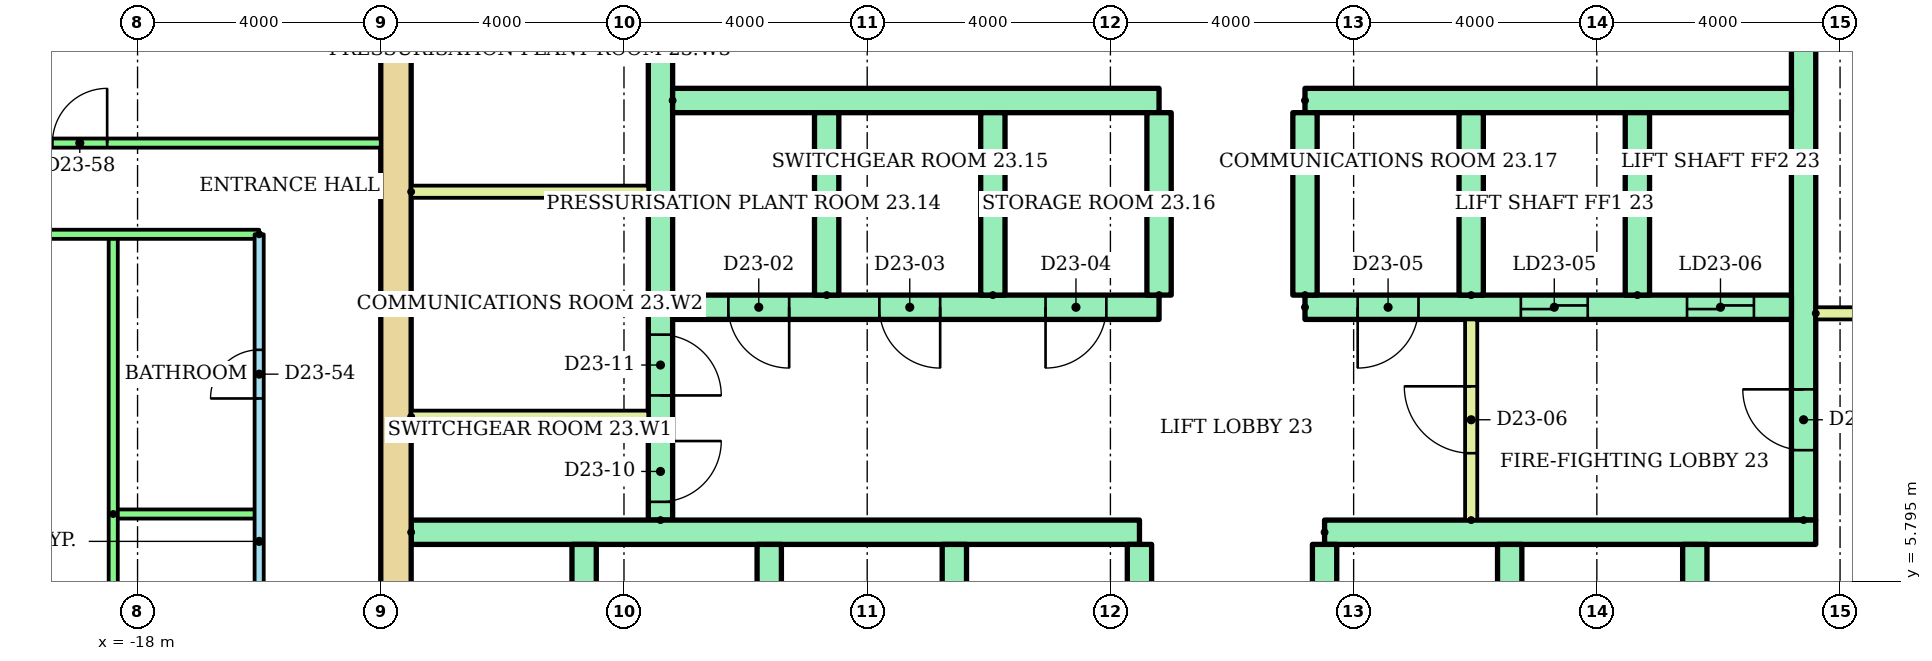
"""IFC4 building model, lengths in metres.
Left out: names, types, materials, properties, quantities, classifications, styles, units other than length and angle.
Written with IfcOpenShell. Run it as: python <this file> out.ifc"""

import sys

from ifc_helpers import new_model, si_unit, direction, frame, frame_2d, origin, place, context, subcontext, project, spatial, rectangle, extrude, element, fill, save


model = new_model("IFC4")
c1 = context("Model", 3, precision=1e-05, world=origin(), true_north=direction((0.0, 1.0)))
c2 = subcontext(c1, "Body", "Model", "MODEL_VIEW")
j1 = project(units=[si_unit("LENGTHUNIT", "METRE"), si_unit("PLANEANGLEUNIT", "RADIAN")], contexts=[c1])
p1 = place(None, origin())
s1 = spatial("IfcSite", under=j1, at=p1, CompositionType="ELEMENT")
p2 = place(p1, origin())
s2 = spatial("IfcBuilding", under=s1, at=p2, CompositionType="ELEMENT")
p3 = place(p2, frame((0.0, 0.0, 90.3)))
s3 = spatial("IfcBuildingStorey", under=s2, at=p3, CompositionType="ELEMENT", Elevation=90.3)
p4 = place(p3, frame((-13.75, 3.0, 0.0), z_axis=(0.0, 0.0, 1.0), x_axis=(0.0, 1.0, 0.0)))
e1 = element("IfcWall", 1, at=p4, inside=s3, PredefinedType="SHEAR", context=c2, shape_type="SweptSolid", body=[
    extrude(rectangle(XDim=17.0, YDim=0.5, at=frame_2d((8.5, 0.0))), origin(), (0.0, 0.0, 1.0), 2.92),
])
p5 = place(p3, frame((-9.4, 6.8, 0.0), z_axis=(0.0, 0.0, 1.0), x_axis=(0.0, 1.0, 0.0)))
e2 = element("IfcWall", 2, at=p5, inside=s3, PredefinedType="SHEAR", context=c2, shape_type="SweptSolid", body=[
    extrude(rectangle(XDim=12.7, YDim=0.4, at=frame_2d((6.35, 0.0))), origin(), (0.0, 0.0, 1.0), 2.92),
])
p6 = place(p5, frame((0.3, 0.0, 0.0)))
e3 = element("IfcOpeningElement", 3, at=p6, cuts=e2, PredefinedType="OPENING", context=c2, shape_type="SweptSolid", body=[
    extrude(rectangle(XDim=1.0, YDim=2.1, at=frame_2d((0.5, 1.05))), frame((0.0, 0.21, 0.0), z_axis=(0.0, -1.0, 0.0), x_axis=(1.0, 0.0, 0.0)), (0.0, 0.0, 1.0), 0.42),
])
p7 = place(p5, frame((2.05, 0.0, 0.0)))
e4 = element("IfcOpeningElement", 4, at=p7, cuts=e2, PredefinedType="OPENING", context=c2, shape_type="SweptSolid", body=[
    extrude(rectangle(XDim=1.0, YDim=2.1, at=frame_2d((0.5, 1.05))), frame((0.0, 0.21, 0.0), z_axis=(0.0, -1.0, 0.0), x_axis=(1.0, 0.0, 0.0)), (0.0, 0.0, 1.0), 0.42),
])
p8 = place(p5, frame((7.925, 0.0, 0.0)))
e5 = element("IfcOpeningElement", 5, at=p8, cuts=e2, PredefinedType="OPENING", context=c2, shape_type="SweptSolid", body=[
    extrude(rectangle(XDim=1.0, YDim=2.1, at=frame_2d((0.5, 1.05))), frame((0.0, 0.21, 0.0), z_axis=(0.0, -1.0, 0.0), x_axis=(1.0, 0.0, 0.0)), (0.0, 0.0, 1.0), 0.42),
])
p9 = place(p3, frame((9.4, 6.8, 0.0), z_axis=(0.0, 0.0, 1.0), x_axis=(0.0, 1.0, 0.0)))
e6 = element("IfcWall", 6, at=p9, inside=s3, PredefinedType="SHEAR", context=c2, shape_type="SweptSolid", body=[
    extrude(rectangle(XDim=12.7, YDim=0.4, at=frame_2d((6.35, 0.0))), origin(), (0.0, 0.0, 1.0), 2.92),
])
p10 = place(p9, frame((1.15, 0.0, 0.0)))
e7 = element("IfcOpeningElement", 7, at=p10, cuts=e6, PredefinedType="OPENING", context=c2, shape_type="SweptSolid", body=[
    extrude(rectangle(XDim=1.0, YDim=2.1, at=frame_2d((0.5, 1.05))), frame((0.0, 0.21, 0.0), z_axis=(0.0, -1.0, 0.0), x_axis=(1.0, 0.0, 0.0)), (0.0, 0.0, 1.0), 0.42),
])
p11 = place(p9, frame((7.925, 0.0, 0.0)))
e8 = element("IfcOpeningElement", 8, at=p11, cuts=e6, PredefinedType="OPENING", context=c2, shape_type="SweptSolid", body=[
    extrude(rectangle(XDim=1.0, YDim=2.1, at=frame_2d((0.5, 1.05))), frame((0.0, 0.21, 0.0), z_axis=(0.0, -1.0, 0.0), x_axis=(1.0, 0.0, 0.0)), (0.0, 0.0, 1.0), 0.42),
])
p12 = place(p3, frame((-13.5, 6.6, 0.0)))
e9 = element("IfcWall", 9, at=p12, inside=s3, PredefinedType="SHEAR", context=c2, shape_type="SweptSolid", body=[
    extrude(rectangle(XDim=11.978, YDim=0.4, at=frame_2d((5.989, 0.0))), origin(), (0.0, 0.0, 1.0), 2.92),
])
p13 = place(p3, frame((1.522, 6.6, 0.0)))
e10 = element("IfcWall", 10, at=p13, inside=s3, PredefinedType="SHEAR", context=c2, shape_type="SweptSolid", body=[
    extrude(rectangle(XDim=8.078, YDim=0.4, at=frame_2d((4.039, 0.0))), origin(), (0.0, 0.0, 1.0), 2.92),
])
for number, where, z_axis, x_axis in (
    (11, (-10.656, 3.4, 0.0), (0.0, 0.0, 1.0), (0.0, 1.0, 0.0)),
    (12, (-7.611, 3.4, 0.0), (0.0, 0.0, 1.0), (0.0, 1.0, 0.0)),
    (13, (-4.567, 3.4, 0.0), (0.0, 0.0, 1.0), (0.0, 1.0, 0.0)),
    (14, (-1.522, 3.4, 0.0), (0.0, 0.0, 1.0), (0.0, 1.0, 0.0)),
    (15, (1.522, 3.4, 0.0), (0.0, 0.0, 1.0), (0.0, 1.0, 0.0)),
    (16, (4.567, 3.4, 0.0), (0.0, 0.0, 1.0), (0.0, 1.0, 0.0)),
    (17, (7.611, 3.4, 0.0), (0.0, 0.0, 1.0), (0.0, 1.0, 0.0)),
):
    element("IfcWall", number, at=place(p3, frame(where, z_axis=z_axis, x_axis=x_axis)), inside=s3, PredefinedType="SHEAR", context=c2, shape_type="SweptSolid", body=[
        extrude(rectangle(XDim=3.0, YDim=0.4, at=frame_2d((1.5, 0.0))), origin(), (0.0, 0.0, 1.0), 2.92),
    ])
p14 = place(p3, frame((-9.2, 10.3, 0.0)))
e18 = element("IfcWall", 18, at=p14, inside=s3, PredefinedType="SHEAR", context=c2, shape_type="SweptSolid", body=[
    extrude(rectangle(XDim=8.0, YDim=0.4, at=frame_2d((4.0, 0.0))), origin(), (0.0, 0.0, 1.0), 2.92),
])
p15 = place(p14, frame((0.917, 0.0, 0.0)))
e19 = element("IfcOpeningElement", 19, at=p15, cuts=e18, PredefinedType="OPENING", context=c2, shape_type="SweptSolid", body=[
    extrude(rectangle(XDim=1.0, YDim=2.1, at=frame_2d((0.5, 1.05))), frame((0.0, 0.21, 0.0), z_axis=(0.0, -1.0, 0.0), x_axis=(1.0, 0.0, 0.0)), (0.0, 0.0, 1.0), 0.42),
])
p16 = place(p14, frame((3.4, 0.0, 0.0)))
e20 = element("IfcOpeningElement", 20, at=p16, cuts=e18, PredefinedType="OPENING", context=c2, shape_type="SweptSolid", body=[
    extrude(rectangle(XDim=1.0, YDim=2.1, at=frame_2d((0.5, 1.05))), frame((0.0, 0.21, 0.0), z_axis=(0.0, -1.0, 0.0), x_axis=(1.0, 0.0, 0.0)), (0.0, 0.0, 1.0), 0.42),
])
p17 = place(p14, frame((6.133, 0.0, 0.0)))
e21 = element("IfcOpeningElement", 21, at=p17, cuts=e18, PredefinedType="OPENING", context=c2, shape_type="SweptSolid", body=[
    extrude(rectangle(XDim=1.0, YDim=2.1, at=frame_2d((0.5, 1.05))), frame((0.0, 0.21, 0.0), z_axis=(0.0, -1.0, 0.0), x_axis=(1.0, 0.0, 0.0)), (0.0, 0.0, 1.0), 0.42),
])
p18 = place(p3, frame((-9.2, 13.7, 0.0)))
e22 = element("IfcWall", 22, at=p18, inside=s3, PredefinedType="SHEAR", context=c2, shape_type="SweptSolid", body=[
    extrude(rectangle(XDim=8.0, YDim=0.4, at=frame_2d((4.0, 0.0))), origin(), (0.0, 0.0, 1.0), 2.92),
])
p19 = place(p3, frame((1.2, 10.3, 0.0)))
e23 = element("IfcWall", 23, at=p19, inside=s3, PredefinedType="SHEAR", context=c2, shape_type="SweptSolid", body=[
    extrude(rectangle(XDim=8.0, YDim=0.4, at=frame_2d((4.0, 0.0))), origin(), (0.0, 0.0, 1.0), 2.92),
])
p20 = place(p19, frame((3.55, 0.0, 0.0)))
e24 = element("IfcOpeningElement", 24, at=p20, cuts=e23, PredefinedType="OPENING", context=c2, shape_type="SweptSolid", body=[
    extrude(rectangle(XDim=1.1, YDim=2.1, at=frame_2d((0.55, 1.05))), frame((0.0, 0.21, 0.0), z_axis=(0.0, -1.0, 0.0), x_axis=(1.0, 0.0, 0.0)), (0.0, 0.0, 1.0), 0.42),
])
p21 = place(p19, frame((6.283, 0.0, 0.0)))
e25 = element("IfcOpeningElement", 25, at=p21, cuts=e23, PredefinedType="OPENING", context=c2, shape_type="SweptSolid", body=[
    extrude(rectangle(XDim=1.1, YDim=2.1, at=frame_2d((0.55, 1.05))), frame((0.0, 0.21, 0.0), z_axis=(0.0, -1.0, 0.0), x_axis=(1.0, 0.0, 0.0)), (0.0, 0.0, 1.0), 0.42),
])
p22 = place(p19, frame((0.867, 0.0, 0.0)))
e26 = element("IfcOpeningElement", 26, at=p22, cuts=e23, PredefinedType="OPENING", context=c2, shape_type="SweptSolid", body=[
    extrude(rectangle(XDim=1.0, YDim=2.1, at=frame_2d((0.5, 1.05))), frame((0.0, 0.21, 0.0), z_axis=(0.0, -1.0, 0.0), x_axis=(1.0, 0.0, 0.0)), (0.0, 0.0, 1.0), 0.42),
])
p23 = place(p3, frame((1.2, 13.7, 0.0)))
e27 = element("IfcWall", 27, at=p23, inside=s3, PredefinedType="SHEAR", context=c2, shape_type="SweptSolid", body=[
    extrude(rectangle(XDim=8.0, YDim=0.4, at=frame_2d((4.0, 0.0))), origin(), (0.0, 0.0, 1.0), 2.92),
])
for number, where, z_axis, x_axis in (
    (28, (-6.667, 10.5, 0.0), (0.0, 0.0, 1.0), (0.0, 1.0, 0.0)),
    (29, (-3.933, 10.5, 0.0), (0.0, 0.0, 1.0), (0.0, 1.0, 0.0)),
    (30, (-1.2, 10.5, 0.0), (0.0, 0.0, 1.0), (0.0, 1.0, 0.0)),
    (31, (1.2, 10.5, 0.0), (0.0, 0.0, 1.0), (0.0, 1.0, 0.0)),
    (32, (3.933, 10.5, 0.0), (0.0, 0.0, 1.0), (0.0, 1.0, 0.0)),
    (33, (6.667, 10.5, 0.0), (0.0, 0.0, 1.0), (0.0, 1.0, 0.0)),
):
    element("IfcWall", number, at=place(p3, frame(where, z_axis=z_axis, x_axis=x_axis)), inside=s3, PredefinedType="SHEAR", context=c2, shape_type="SweptSolid", body=[
        extrude(rectangle(XDim=3.0, YDim=0.4, at=frame_2d((1.5, 0.0))), origin(), (0.0, 0.0, 1.0), 2.92),
    ])
p24 = place(p3, frame((3.933, 6.8, 0.0), z_axis=(0.0, 0.0, 1.0), x_axis=(0.0, 1.0, 0.0)))
e34 = element("IfcWall", 34, at=p24, inside=s3, PredefinedType="PARTITIONING", context=c2, shape_type="SweptSolid", body=[
    extrude(rectangle(XDim=3.3, YDim=0.2, at=frame_2d((1.65, 0.0))), origin(), (0.0, 0.0, 1.0), 2.92),
])
p25 = place(p24, frame((1.1, 0.0, 0.0)))
e35 = element("IfcOpeningElement", 35, at=p25, cuts=e34, PredefinedType="OPENING", context=c2, shape_type="SweptSolid", body=[
    extrude(rectangle(XDim=1.1, YDim=2.1, at=frame_2d((0.55, 1.05))), frame((0.0, 0.11, 0.0), z_axis=(0.0, -1.0, 0.0), x_axis=(1.0, 0.0, 0.0)), (0.0, 0.0, 1.0), 0.22),
])
for number, where in (
    (36, (-13.5, 8.5, 0.0)),
    (37, (-13.5, 12.2, 0.0)),
    (38, (9.6, 10.2, 0.0)),
):
    element("IfcWall", number, at=place(p3, frame(where)), inside=s3, PredefinedType="PARTITIONING", context=c2, shape_type="SweptSolid", body=[
        extrude(rectangle(XDim=3.9, YDim=0.2, at=frame_2d((1.95, 0.0))), origin(), (0.0, 0.0, 1.0), 2.92),
    ])
p26 = place(p3, frame((-16.0, 1.4, 0.0), z_axis=(0.0, 0.0, 1.0), x_axis=(0.0, 1.0, 0.0)))
e39 = element("IfcWall", 39, at=p26, inside=s3, PredefinedType="PARTITIONING", context=c2, shape_type="SweptSolid", body=[
    extrude(rectangle(XDim=10.1, YDim=0.15, at=frame_2d((5.05, 0.0))), origin(), (0.0, 0.0, 1.0), 2.4),
])
p27 = place(p26, frame((2.3, 0.0, 0.0)))
e40 = element("IfcOpeningElement", 40, at=p27, cuts=e39, PredefinedType="OPENING", context=c2, shape_type="SweptSolid", body=[
    extrude(rectangle(XDim=0.9, YDim=2.1, at=frame_2d((0.45, 1.05))), frame((0.0, 0.085, 0.0), z_axis=(0.0, -1.0, 0.0), x_axis=(1.0, 0.0, 0.0)), (0.0, 0.0, 1.0), 0.17),
])
p28 = place(p26, frame((7.4, 0.0, 0.0)))
e41 = element("IfcOpeningElement", 41, at=p28, cuts=e39, PredefinedType="OPENING", context=c2, shape_type="SweptSolid", body=[
    extrude(rectangle(XDim=0.8, YDim=2.1, at=frame_2d((0.4, 1.05))), frame((0.0, 0.085, 0.0), z_axis=(0.0, -1.0, 0.0), x_axis=(1.0, 0.0, 0.0)), (0.0, 0.0, 1.0), 0.17),
])
p29 = place(p3, frame((-18.4, 6.9, 0.0)))
e42 = element("IfcWall", 42, at=p29, inside=s3, PredefinedType="PARTITIONING", context=c2, shape_type="SweptSolid", body=[
    extrude(rectangle(XDim=2.4, YDim=0.15, at=frame_2d((1.2, 0.0))), origin(), (0.0, 0.0, 1.0), 2.4),
])
p30 = place(p3, frame((-18.4, 1.4, 0.0), z_axis=(0.0, 0.0, 1.0), x_axis=(0.0, 1.0, 0.0)))
e43 = element("IfcWall", 43, at=p30, inside=s3, PredefinedType="PARTITIONING", context=c2, shape_type="SweptSolid", body=[
    extrude(rectangle(XDim=10.1, YDim=0.15, at=frame_2d((5.05, 0.0))), origin(), (0.0, 0.0, 1.0), 2.4),
])
p31 = place(p3, frame((-16.0, 11.5, 0.0), z_axis=(0.0, 0.0, 1.0), x_axis=(-1.0, 0.0, 0.0)))
e44 = element("IfcWall", 44, at=p31, inside=s3, PredefinedType="PARTITIONING", context=c2, shape_type="SweptSolid", body=[
    extrude(rectangle(XDim=12.62, YDim=0.15, at=frame_2d((6.31, 0.0))), origin(), (0.0, 0.0, 1.0), 2.4),
])
p32 = place(p31, frame((4.411, 0.0, 0.0)))
e45 = element("IfcOpeningElement", 45, at=p32, cuts=e44, PredefinedType="OPENING", context=c2, shape_type="SweptSolid", body=[
    extrude(rectangle(XDim=0.9, YDim=2.1, at=frame_2d((0.45, 1.05))), frame((0.0, 0.085, 0.0), z_axis=(0.0, -1.0, 0.0), x_axis=(1.0, 0.0, 0.0)), (0.0, 0.0, 1.0), 0.17),
])
p33 = place(p31, frame((9.825, 0.0, 0.0)))
e46 = element("IfcOpeningElement", 46, at=p33, cuts=e44, PredefinedType="OPENING", context=c2, shape_type="SweptSolid", body=[
    extrude(rectangle(XDim=0.9, YDim=2.1, at=frame_2d((0.45, 1.05))), frame((0.0, 0.085, 0.0), z_axis=(0.0, -1.0, 0.0), x_axis=(1.0, 0.0, 0.0)), (0.0, 0.0, 1.0), 0.17),
])
p34 = place(p3, frame((-28.62, 13.0, 0.0)))
e47 = element("IfcWall", 47, at=p34, inside=s3, PredefinedType="PARTITIONING", context=c2, shape_type="SweptSolid", body=[
    extrude(rectangle(XDim=14.62, YDim=0.15, at=frame_2d((7.31, 0.0))), origin(), (0.0, 0.0, 1.0), 2.4),
])
p35 = place(p34, frame((1.97, 0.0, 0.0)))
e48 = element("IfcOpeningElement", 48, at=p35, cuts=e47, PredefinedType="OPENING", context=c2, shape_type="SweptSolid", body=[
    extrude(rectangle(XDim=1.0, YDim=2.1, at=frame_2d((0.5, 1.05))), frame((0.0, 0.085, 0.0), z_axis=(0.0, -1.0, 0.0), x_axis=(1.0, 0.0, 0.0)), (0.0, 0.0, 1.0), 0.17),
])
p36 = place(p34, frame((9.22, 0.0, 0.0)))
e49 = element("IfcOpeningElement", 49, at=p36, cuts=e47, PredefinedType="OPENING", context=c2, shape_type="SweptSolid", body=[
    extrude(rectangle(XDim=0.9, YDim=2.1, at=frame_2d((0.45, 1.05))), frame((0.0, 0.085, 0.0), z_axis=(0.0, -1.0, 0.0), x_axis=(1.0, 0.0, 0.0)), (0.0, 0.0, 1.0), 0.17),
])
p37 = place(p20, origin())
e50 = element("IfcDoor", 50, at=p37, inside=s3, OperationType="SLIDING_TO_LEFT", PredefinedType="DOOR", context=c2, shape_type="SweptSolid", body=[
    extrude(rectangle(XDim=1.1, YDim=2.1, at=frame_2d((0.55, 1.05))), frame((0.0, 0.025, 0.0), z_axis=(0.0, -1.0, 0.0), x_axis=(1.0, 0.0, 0.0)), (0.0, 0.0, 1.0), 0.05),
])
fill(e24, e50)
p38 = place(p21, origin())
e51 = element("IfcDoor", 51, at=p38, inside=s3, OperationType="SLIDING_TO_LEFT", PredefinedType="DOOR", context=c2, shape_type="SweptSolid", body=[
    extrude(rectangle(XDim=1.1, YDim=2.1, at=frame_2d((0.55, 1.05))), frame((0.0, 0.025, 0.0), z_axis=(0.0, -1.0, 0.0), x_axis=(1.0, 0.0, 0.0)), (0.0, 0.0, 1.0), 0.05),
])
fill(e25, e51)
p39 = place(p15, frame((1.0, 0.0, 0.0), z_axis=(0.0, 0.0, 1.0), x_axis=(-1.0, 0.0, 0.0)))
e52 = element("IfcDoor", 52, at=p39, inside=s3, OperationType="SINGLE_SWING_RIGHT", PredefinedType="DOOR", context=c2, shape_type="SweptSolid", body=[
    extrude(rectangle(XDim=1.0, YDim=2.1, at=frame_2d((0.5, 1.05))), frame((0.0, 0.025, 0.0), z_axis=(0.0, -1.0, 0.0), x_axis=(1.0, 0.0, 0.0)), (0.0, 0.0, 1.0), 0.05),
])
fill(e19, e52)
p40 = place(p16, frame((1.0, 0.0, 0.0), z_axis=(0.0, 0.0, 1.0), x_axis=(-1.0, 0.0, 0.0)))
e53 = element("IfcDoor", 53, at=p40, inside=s3, OperationType="SINGLE_SWING_RIGHT", PredefinedType="DOOR", context=c2, shape_type="SweptSolid", body=[
    extrude(rectangle(XDim=1.0, YDim=2.1, at=frame_2d((0.5, 1.05))), frame((0.0, 0.025, 0.0), z_axis=(0.0, -1.0, 0.0), x_axis=(1.0, 0.0, 0.0)), (0.0, 0.0, 1.0), 0.05),
])
fill(e20, e53)
p41 = place(p17, frame((1.0, 0.0, 0.0), z_axis=(0.0, 0.0, 1.0), x_axis=(-1.0, 0.0, 0.0)))
e54 = element("IfcDoor", 54, at=p41, inside=s3, OperationType="SINGLE_SWING_LEFT", PredefinedType="DOOR", context=c2, shape_type="SweptSolid", body=[
    extrude(rectangle(XDim=1.0, YDim=2.1, at=frame_2d((0.5, 1.05))), frame((0.0, 0.025, 0.0), z_axis=(0.0, -1.0, 0.0), x_axis=(1.0, 0.0, 0.0)), (0.0, 0.0, 1.0), 0.05),
])
fill(e21, e54)
p42 = place(p22, frame((1.0, 0.0, 0.0), z_axis=(0.0, 0.0, 1.0), x_axis=(-1.0, 0.0, 0.0)))
e55 = element("IfcDoor", 55, at=p42, inside=s3, OperationType="SINGLE_SWING_LEFT", PredefinedType="DOOR", context=c2, shape_type="SweptSolid", body=[
    extrude(rectangle(XDim=1.0, YDim=2.1, at=frame_2d((0.5, 1.05))), frame((0.0, 0.025, 0.0), z_axis=(0.0, -1.0, 0.0), x_axis=(1.0, 0.0, 0.0)), (0.0, 0.0, 1.0), 0.05),
])
fill(e26, e55)
p43 = place(p25, origin())
e56 = element("IfcDoor", 56, at=p43, inside=s3, OperationType="SINGLE_SWING_RIGHT", PredefinedType="DOOR", context=c2, shape_type="SweptSolid", body=[
    extrude(rectangle(XDim=1.1, YDim=2.1, at=frame_2d((0.55, 1.05))), frame((0.0, 0.025, 0.0), z_axis=(0.0, -1.0, 0.0), x_axis=(1.0, 0.0, 0.0)), (0.0, 0.0, 1.0), 0.05),
])
fill(e35, e56)
p44 = place(p6, frame((1.0, 0.0, 0.0), z_axis=(0.0, 0.0, 1.0), x_axis=(-1.0, 0.0, 0.0)))
e57 = element("IfcDoor", 57, at=p44, inside=s3, OperationType="SINGLE_SWING_RIGHT", PredefinedType="DOOR", context=c2, shape_type="SweptSolid", body=[
    extrude(rectangle(XDim=1.0, YDim=2.1, at=frame_2d((0.5, 1.05))), frame((0.0, 0.025, 0.0), z_axis=(0.0, -1.0, 0.0), x_axis=(1.0, 0.0, 0.0)), (0.0, 0.0, 1.0), 0.05),
])
fill(e3, e57)
p45 = place(p7, frame((1.0, 0.0, 0.0), z_axis=(0.0, 0.0, 1.0), x_axis=(-1.0, 0.0, 0.0)))
e58 = element("IfcDoor", 58, at=p45, inside=s3, OperationType="SINGLE_SWING_LEFT", PredefinedType="DOOR", context=c2, shape_type="SweptSolid", body=[
    extrude(rectangle(XDim=1.0, YDim=2.1, at=frame_2d((0.5, 1.05))), frame((0.0, 0.025, 0.0), z_axis=(0.0, -1.0, 0.0), x_axis=(1.0, 0.0, 0.0)), (0.0, 0.0, 1.0), 0.05),
])
fill(e4, e58)
p46 = place(p10, origin())
e59 = element("IfcDoor", 59, at=p46, inside=s3, OperationType="SINGLE_SWING_RIGHT", PredefinedType="DOOR", context=c2, shape_type="SweptSolid", body=[
    extrude(rectangle(XDim=1.0, YDim=2.1, at=frame_2d((0.5, 1.05))), frame((0.0, 0.025, 0.0), z_axis=(0.0, -1.0, 0.0), x_axis=(1.0, 0.0, 0.0)), (0.0, 0.0, 1.0), 0.05),
])
fill(e7, e59)
p47 = place(p28, origin())
e60 = element("IfcDoor", 60, at=p47, inside=s3, OperationType="SINGLE_SWING_LEFT", PredefinedType="DOOR", context=c2, shape_type="SweptSolid", body=[
    extrude(rectangle(XDim=0.8, YDim=2.1, at=frame_2d((0.4, 1.05))), frame((0.0, 0.025, 0.0), z_axis=(0.0, -1.0, 0.0), x_axis=(1.0, 0.0, 0.0)), (0.0, 0.0, 1.0), 0.05),
])
fill(e41, e60)
p48 = place(p36, origin())
e61 = element("IfcDoor", 61, at=p48, inside=s3, OperationType="SINGLE_SWING_RIGHT", PredefinedType="DOOR", context=c2, shape_type="SweptSolid", body=[
    extrude(rectangle(XDim=0.9, YDim=2.1, at=frame_2d((0.45, 1.05))), frame((0.0, 0.025, 0.0), z_axis=(0.0, -1.0, 0.0), x_axis=(1.0, 0.0, 0.0)), (0.0, 0.0, 1.0), 0.05),
])
fill(e49, e61)
save(model, sys.argv[1])
